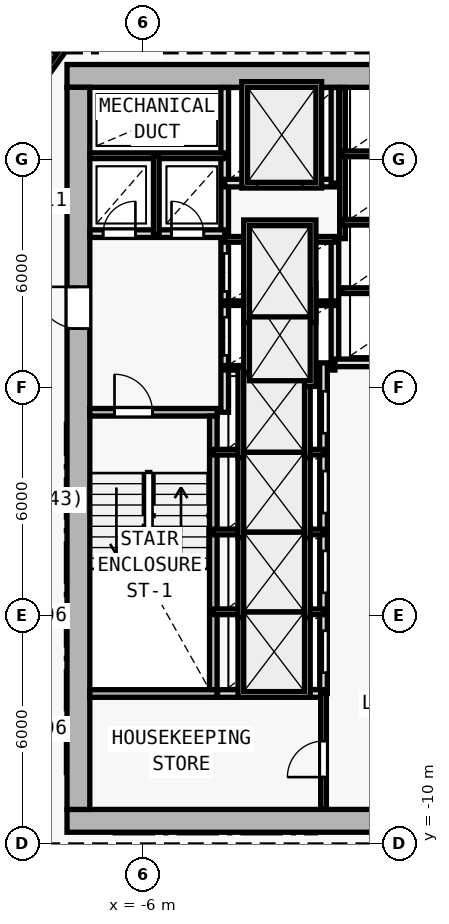
"""IFC4 building model, lengths in metres.
Left out: names, types, materials, properties, quantities, classifications, styles, units other than length and angle.
Written with IfcOpenShell. Run it as: python <this file> out.ifc"""

import sys

from ifc_helpers import new_model, si_unit, direction, frame, frame_2d, origin, origin_2d, place, context, subcontext, project, spatial, rectangle, i_section, extrude, element, fill, save


model = new_model("IFC4")
c1 = context("Model", 3, precision=1e-05, world=origin(), true_north=direction((0.0, 1.0)))
c2 = subcontext(c1, "Body", "Model", "MODEL_VIEW")
j1 = project(units=[si_unit("LENGTHUNIT", "METRE"), si_unit("PLANEANGLEUNIT", "RADIAN")], contexts=[c1])
p1 = place(None, origin())
s1 = spatial("IfcSite", under=j1, at=p1, CompositionType="ELEMENT")
p2 = place(p1, origin())
s2 = spatial("IfcBuilding", under=s1, at=p2, CompositionType="ELEMENT")
p3 = place(p2, frame((0.0, 0.0, 93.3)))
s3 = spatial("IfcBuildingStorey", under=s2, at=p3, CompositionType="ELEMENT", Elevation=93.3)
for number, where, z_axis, x_axis in (
    (1, (-7.7, -9.4, 0.0), (0.0, 0.0, 1.0), (1.0, 0.0, 0.0)),
    (2, (-7.7, 10.2, 0.0), (0.0, 0.0, 1.0), (1.0, 0.0, 0.0)),
    (3, (0.0, -9.4, 0.0), (0.0, 0.0, 1.0), (1.0, 0.0, 0.0)),
    (4, (-7.7, 2.0, 0.0), (0.0, 0.0, 1.0), (1.0, 0.0, 0.0)),
):
    element("IfcColumn", number, at=place(p3, frame(where, z_axis=z_axis, x_axis=x_axis)), inside=s3, PredefinedType="COLUMN", context=c2, shape_type="SweptSolid", body=[
        extrude(i_section(OverallWidth=0.409, OverallDepth=0.425, WebThickness=0.021, FlangeThickness=0.034, FilletRadius=0.015, at=origin_2d()), origin(), (0.0, 0.0, 1.0), 3.6),
    ])
p4 = place(p3, frame((-8.0, -9.4, 0.0), z_axis=(0.0, 0.0, 1.0), x_axis=(1.0, 0.0, 0.0)))
e5 = element("IfcWall", 5, at=p4, inside=s3, PredefinedType="SHEAR", context=c2, shape_type="SweptSolid", body=[
    extrude(rectangle(XDim=16.0, YDim=0.6, at=frame_2d((8.0, 0.0))), origin(), (0.0, 0.0, 1.0), 3.35),
])
p5 = place(p4, frame((9.65, 0.0, 0.0)))
e6 = element("IfcOpeningElement", 6, at=p5, cuts=e5, PredefinedType="OPENING", context=c2, shape_type="SweptSolid", body=[
    extrude(rectangle(XDim=1.5, YDim=2.2, at=frame_2d((0.75, 1.1))), frame((0.0, 0.31, 0.0), z_axis=(0.0, -1.0, 0.0), x_axis=(1.0, 0.0, 0.0)), (0.0, 0.0, 1.0), 0.62),
])
p6 = place(p3, frame((8.0, 10.2, 0.0), z_axis=(0.0, 0.0, 1.0), x_axis=(-1.0, 0.0, 0.0)))
e7 = element("IfcWall", 7, at=p6, inside=s3, PredefinedType="SHEAR", context=c2, shape_type="SweptSolid", body=[
    extrude(rectangle(XDim=16.0, YDim=0.6, at=frame_2d((8.0, 0.0))), origin(), (0.0, 0.0, 1.0), 3.35),
])
p7 = place(p6, frame((4.45, 0.0, 0.0)))
e8 = element("IfcOpeningElement", 8, at=p7, cuts=e7, PredefinedType="OPENING", context=c2, shape_type="SweptSolid", body=[
    extrude(rectangle(XDim=1.1, YDim=2.15, at=frame_2d((0.55, 1.075))), frame((0.0, 0.31, 0.0), z_axis=(0.0, -1.0, 0.0), x_axis=(1.0, 0.0, 0.0)), (0.0, 0.0, 1.0), 0.62),
])
p8 = place(p3, frame((-7.7, -9.1, 0.0), z_axis=(0.0, 0.0, 1.0), x_axis=(0.0, 1.0, 0.0)))
e9 = element("IfcWall", 9, at=p8, inside=s3, PredefinedType="SHEAR", context=c2, shape_type="SweptSolid", body=[
    extrude(rectangle(XDim=19.0, YDim=0.6, at=frame_2d((9.5, 0.0))), origin(), (0.0, 0.0, 1.0), 3.35),
])
p9 = place(p8, frame((12.65, 0.0, 0.0)))
e10 = element("IfcOpeningElement", 10, at=p9, cuts=e9, PredefinedType="OPENING", context=c2, shape_type="SweptSolid", body=[
    extrude(rectangle(XDim=1.1, YDim=2.15, at=frame_2d((0.55, 1.075))), frame((0.0, 0.31, 0.0), z_axis=(0.0, -1.0, 0.0), x_axis=(1.0, 0.0, 0.0)), (0.0, 0.0, 1.0), 0.62),
])
p10 = place(p3, frame((-7.4, 1.35, 0.0), z_axis=(0.0, 0.0, 1.0), x_axis=(1.0, 0.0, 0.0)))
e11 = element("IfcWall", 11, at=p10, inside=s3, PredefinedType="SOLIDWALL", context=c2, shape_type="SweptSolid", body=[
    extrude(rectangle(XDim=3.35, YDim=0.2, at=frame_2d((1.675, 0.0))), origin(), (0.0, 0.0, 1.0), 3.35),
])
p11 = place(p10, frame((0.65, 0.0, 0.0)))
e12 = element("IfcOpeningElement", 12, at=p11, cuts=e11, PredefinedType="OPENING", context=c2, shape_type="SweptSolid", body=[
    extrude(rectangle(XDim=1.0, YDim=2.15, at=frame_2d((0.5, 1.075))), frame((0.0, 0.11, 0.0), z_axis=(0.0, -1.0, 0.0), x_axis=(1.0, 0.0, 0.0)), (0.0, 0.0, 1.0), 0.22),
])
p12 = place(p3, frame((-4.15, -5.95, 0.0), z_axis=(0.0, 0.0, 1.0), x_axis=(0.0, 1.0, 0.0)))
e13 = element("IfcWall", 13, at=p12, inside=s3, PredefinedType="SOLIDWALL", context=c2, shape_type="SweptSolid", body=[
    extrude(rectangle(XDim=7.2, YDim=0.2, at=frame_2d((3.6, 0.0))), origin(), (0.0, 0.0, 1.0), 3.35),
])
p13 = place(p3, frame((-3.85, 1.35, 0.0), z_axis=(0.0, 0.0, 1.0), x_axis=(0.0, 1.0, 0.0)))
e14 = element("IfcWall", 14, at=p13, inside=s3, PredefinedType="SOLIDWALL", context=c2, shape_type="SweptSolid", body=[
    extrude(rectangle(XDim=8.545, YDim=0.2, at=frame_2d((4.272, 0.0))), origin(), (0.0, 0.0, 1.0), 3.35),
])
p14 = place(p13, frame((1.5, 0.0, 0.0)))
e15 = element("IfcOpeningElement", 15, at=p14, cuts=e14, PredefinedType="OPENING", context=c2, shape_type="SweptSolid", body=[
    extrude(rectangle(XDim=1.0, YDim=2.15, at=frame_2d((0.5, 1.075))), frame((0.0, 0.11, 0.0), z_axis=(0.0, -1.0, 0.0), x_axis=(1.0, 0.0, 0.0)), (0.0, 0.0, 1.0), 0.22),
])
p15 = place(p13, frame((3.18, 0.0, 0.0)))
e16 = element("IfcOpeningElement", 16, at=p15, cuts=e14, PredefinedType="OPENING", context=c2, shape_type="SweptSolid", body=[
    extrude(rectangle(XDim=1.0, YDim=2.15, at=frame_2d((0.5, 1.075))), frame((0.0, 0.11, 0.0), z_axis=(0.0, -1.0, 0.0), x_axis=(1.0, 0.0, 0.0)), (0.0, 0.0, 1.0), 0.22),
])
p16 = place(p3, frame((-7.395, 6.05, 0.0), z_axis=(0.0, 0.0, 1.0), x_axis=(1.0, 0.0, 0.0)))
e17 = element("IfcWall", 17, at=p16, inside=s3, PredefinedType="SOLIDWALL", context=c2, shape_type="SweptSolid", body=[
    extrude(rectangle(XDim=3.545, YDim=0.2, at=frame_2d((1.772, 0.0))), origin(), (0.0, 0.0, 1.0), 3.35),
])
p17 = place(p16, frame((0.345, 0.0, 0.0)))
e18 = element("IfcOpeningElement", 18, at=p17, cuts=e17, PredefinedType="OPENING", context=c2, shape_type="SweptSolid", body=[
    extrude(rectangle(XDim=0.85, YDim=2.1, at=frame_2d((0.425, 1.05))), frame((0.0, 0.11, 0.0), z_axis=(0.0, -1.0, 0.0), x_axis=(1.0, 0.0, 0.0)), (0.0, 0.0, 1.0), 0.22),
])
p18 = place(p16, frame((2.145, 0.0, 0.0)))
e19 = element("IfcOpeningElement", 19, at=p18, cuts=e17, PredefinedType="OPENING", context=c2, shape_type="SweptSolid", body=[
    extrude(rectangle(XDim=0.85, YDim=2.1, at=frame_2d((0.425, 1.05))), frame((0.0, 0.11, 0.0), z_axis=(0.0, -1.0, 0.0), x_axis=(1.0, 0.0, 0.0)), (0.0, 0.0, 1.0), 0.22),
])
p19 = place(p3, frame((-7.395, 8.1, 0.0), z_axis=(0.0, 0.0, 1.0), x_axis=(1.0, 0.0, 0.0)))
e20 = element("IfcWall", 20, at=p19, inside=s3, PredefinedType="PARTITIONING", context=c2, shape_type="SweptSolid", body=[
    extrude(rectangle(XDim=3.545, YDim=0.15, at=frame_2d((1.772, 0.0))), origin(), (0.0, 0.0, 1.0), 3.35),
])
p20 = place(p3, frame((-5.65, 6.05, 0.0), z_axis=(0.0, 0.0, 1.0), x_axis=(0.0, 1.0, 0.0)))
e21 = element("IfcWall", 21, at=p20, inside=s3, PredefinedType="PARTITIONING", context=c2, shape_type="SweptSolid", body=[
    extrude(rectangle(XDim=2.05, YDim=0.15, at=frame_2d((1.025, 0.0))), origin(), (0.0, 0.0, 1.0), 3.35),
])
p21 = place(p3, frame((-0.95, 2.65, 0.0), z_axis=(0.0, 0.0, 1.0), x_axis=(0.0, 1.0, 0.0)))
e22 = element("IfcWall", 22, at=p21, inside=s3, PredefinedType="SOLIDWALL", context=c2, shape_type="SweptSolid", body=[
    extrude(rectangle(XDim=3.27, YDim=0.2, at=frame_2d((1.635, 0.0))), origin(), (0.0, 0.0, 1.0), 3.35),
])
for number, where, z_axis, x_axis in (
    (23, (-3.85, 2.52, 0.0), (0.0, 0.0, 1.0), (1.0, 0.0, 0.0)),
    (24, (-3.85, 4.22, 0.0), (0.0, 0.0, 1.0), (1.0, 0.0, 0.0)),
):
    element("IfcWall", number, at=place(p3, frame(where, z_axis=z_axis, x_axis=x_axis)), inside=s3, PredefinedType="PARTITIONING", context=c2, shape_type="SweptSolid", body=[
        extrude(rectangle(XDim=2.9, YDim=0.12, at=frame_2d((1.45, 0.0))), origin(), (0.0, 0.0, 1.0), 3.35),
    ])
p22 = place(p3, frame((-3.85, 5.9, 0.0), z_axis=(0.0, 0.0, 1.0), x_axis=(1.0, 0.0, 0.0)))
e25 = element("IfcWall", 25, at=p22, inside=s3, PredefinedType="PARTITIONING", context=c2, shape_type="SweptSolid", body=[
    extrude(rectangle(XDim=2.9, YDim=0.15, at=frame_2d((1.45, 0.0))), origin(), (0.0, 0.0, 1.0), 3.35),
])
p23 = place(p3, frame((-3.85, 7.38, 0.0), z_axis=(0.0, 0.0, 1.0), x_axis=(1.0, 0.0, 0.0)))
e26 = element("IfcWall", 26, at=p23, inside=s3, PredefinedType="SOLIDWALL", context=c2, shape_type="SweptSolid", body=[
    extrude(rectangle(XDim=2.9, YDim=0.2, at=frame_2d((1.45, 0.0))), origin(), (0.0, 0.0, 1.0), 3.35),
])
p24 = place(p23, frame((0.85, 0.0, 0.0)))
e27 = element("IfcOpeningElement", 27, at=p24, cuts=e26, PredefinedType="OPENING", context=c2, shape_type="SweptSolid", body=[
    extrude(rectangle(XDim=1.2, YDim=2.2, at=frame_2d((0.6, 1.1))), frame((0.0, 0.11, 0.0), z_axis=(0.0, -1.0, 0.0), x_axis=(1.0, 0.0, 0.0)), (0.0, 0.0, 1.0), 0.22),
])
p25 = place(p3, frame((-0.95, 7.38, 0.0), z_axis=(0.0, 0.0, 1.0), x_axis=(0.0, 1.0, 0.0)))
e28 = element("IfcWall", 28, at=p25, inside=s3, PredefinedType="SOLIDWALL", context=c2, shape_type="SweptSolid", body=[
    extrude(rectangle(XDim=2.515, YDim=0.2, at=frame_2d((1.258, 0.0))), origin(), (0.0, 0.0, 1.0), 3.35),
])
p26 = place(p3, frame((-1.25, -6.05, 0.0), z_axis=(0.0, 0.0, 1.0), x_axis=(0.0, 1.0, 0.0)))
e29 = element("IfcWall", 29, at=p26, inside=s3, PredefinedType="SOLIDWALL", context=c2, shape_type="SweptSolid", body=[
    extrude(rectangle(XDim=8.7, YDim=0.2, at=frame_2d((4.35, 0.0))), origin(), (0.0, 0.0, 1.0), 3.35),
])
p27 = place(p26, frame((0.55, 0.0, 0.0)))
e30 = element("IfcOpeningElement", 30, at=p27, cuts=e29, PredefinedType="OPENING", context=c2, shape_type="SweptSolid", body=[
    extrude(rectangle(XDim=1.1, YDim=2.15, at=frame_2d((0.55, 1.075))), frame((0.0, 0.11, 0.0), z_axis=(0.0, -1.0, 0.0), x_axis=(1.0, 0.0, 0.0)), (0.0, 0.0, 1.0), 0.22),
])
p28 = place(p26, frame((2.65, 0.0, 0.0)))
e31 = element("IfcOpeningElement", 31, at=p28, cuts=e29, PredefinedType="OPENING", context=c2, shape_type="SweptSolid", body=[
    extrude(rectangle(XDim=1.1, YDim=2.15, at=frame_2d((0.55, 1.075))), frame((0.0, 0.11, 0.0), z_axis=(0.0, -1.0, 0.0), x_axis=(1.0, 0.0, 0.0)), (0.0, 0.0, 1.0), 0.22),
])
p29 = place(p26, frame((4.75, 0.0, 0.0)))
e32 = element("IfcOpeningElement", 32, at=p29, cuts=e29, PredefinedType="OPENING", context=c2, shape_type="SweptSolid", body=[
    extrude(rectangle(XDim=1.1, YDim=2.15, at=frame_2d((0.55, 1.075))), frame((0.0, 0.11, 0.0), z_axis=(0.0, -1.0, 0.0), x_axis=(1.0, 0.0, 0.0)), (0.0, 0.0, 1.0), 0.22),
])
p30 = place(p26, frame((6.85, 0.0, 0.0)))
e33 = element("IfcOpeningElement", 33, at=p30, cuts=e29, PredefinedType="OPENING", context=c2, shape_type="SweptSolid", body=[
    extrude(rectangle(XDim=1.1, YDim=2.15, at=frame_2d((0.55, 1.075))), frame((0.0, 0.11, 0.0), z_axis=(0.0, -1.0, 0.0), x_axis=(1.0, 0.0, 0.0)), (0.0, 0.0, 1.0), 0.22),
])
for number, where, z_axis, x_axis in (
    (34, (-4.15, -3.9, 0.0), (0.0, 0.0, 1.0), (1.0, 0.0, 0.0)),
    (35, (-4.15, -1.8, 0.0), (0.0, 0.0, 1.0), (1.0, 0.0, 0.0)),
    (36, (-4.15, 0.3, 0.0), (0.0, 0.0, 1.0), (1.0, 0.0, 0.0)),
):
    element("IfcWall", number, at=place(p3, frame(where, z_axis=z_axis, x_axis=x_axis)), inside=s3, PredefinedType="PARTITIONING", context=c2, shape_type="SweptSolid", body=[
        extrude(rectangle(XDim=2.9, YDim=0.15, at=frame_2d((1.45, 0.0))), origin(), (0.0, 0.0, 1.0), 3.35),
    ])
p31 = place(p3, frame((-0.95, 2.65, 0.0), z_axis=(0.0, 0.0, 1.0), x_axis=(1.0, 0.0, 0.0)))
e37 = element("IfcWall", 37, at=p31, inside=s3, PredefinedType="SOLIDWALL", context=c2, shape_type="SweptSolid", body=[
    extrude(rectangle(XDim=2.9, YDim=0.2, at=frame_2d((1.45, 0.0))), origin(), (0.0, 0.0, 1.0), 3.35),
])
p32 = place(p3, frame((-0.75, 5.92, 0.0), z_axis=(0.0, 0.0, 1.0), x_axis=(0.0, 1.0, 0.0)))
e38 = element("IfcWall", 38, at=p32, inside=s3, PredefinedType="PARTITIONING", context=c2, shape_type="SweptSolid", body=[
    extrude(rectangle(XDim=3.975, YDim=0.15, at=frame_2d((1.988, 0.0))), origin(), (0.0, 0.0, 1.0), 3.35),
])
for number, where, z_axis, x_axis in (
    (39, (-0.75, 4.55, 0.0), (0.0, 0.0, 1.0), (1.0, 0.0, 0.0)),
    (40, (-0.75, 6.35, 0.0), (0.0, 0.0, 1.0), (1.0, 0.0, 0.0)),
    (41, (-0.75, 8.15, 0.0), (0.0, 0.0, 1.0), (1.0, 0.0, 0.0)),
):
    element("IfcWall", number, at=place(p3, frame(where, z_axis=z_axis, x_axis=x_axis)), inside=s3, PredefinedType="PARTITIONING", context=c2, shape_type="SweptSolid", body=[
        extrude(rectangle(XDim=2.7, YDim=0.15, at=frame_2d((1.35, 0.0))), origin(), (0.0, 0.0, 1.0), 3.35),
    ])
p33 = place(p3, frame((-7.4, -6.05, 0.0), z_axis=(0.0, 0.0, 1.0), x_axis=(1.0, 0.0, 0.0)))
e42 = element("IfcWall", 42, at=p33, inside=s3, PredefinedType="SOLIDWALL", context=c2, shape_type="SweptSolid", body=[
    extrude(rectangle(XDim=3.35, YDim=0.2, at=frame_2d((1.675, 0.0))), origin(), (0.0, 0.0, 1.0), 3.35),
])
p34 = place(p3, frame((-4.04, -6.05, 0.0), z_axis=(0.0, 0.0, 1.0), x_axis=(1.0, 0.0, 0.0)))
e43 = element("IfcWall", 43, at=p34, inside=s3, PredefinedType="SOLIDWALL", context=c2, shape_type="SweptSolid", body=[
    extrude(rectangle(XDim=2.79, YDim=0.2, at=frame_2d((1.395, 0.0))), origin(), (0.0, 0.0, 1.0), 3.35),
])
p35 = place(p3, frame((-1.25, -9.095, 0.0), z_axis=(0.0, 0.0, 1.0), x_axis=(0.0, 1.0, 0.0)))
e44 = element("IfcWall", 44, at=p35, inside=s3, PredefinedType="PARTITIONING", context=c2, shape_type="SweptSolid", body=[
    extrude(rectangle(XDim=3.045, YDim=0.15, at=frame_2d((1.522, 0.0))), origin(), (0.0, 0.0, 1.0), 3.35),
])
p36 = place(p35, frame((0.845, 0.0, 0.0)))
e45 = element("IfcOpeningElement", 45, at=p36, cuts=e44, PredefinedType="OPENING", context=c2, shape_type="SweptSolid", body=[
    extrude(rectangle(XDim=0.95, YDim=2.1, at=frame_2d((0.475, 1.05))), frame((0.0, 0.085, 0.0), z_axis=(0.0, -1.0, 0.0), x_axis=(1.0, 0.0, 0.0)), (0.0, 0.0, 1.0), 0.17),
])
p37 = place(p3, frame((-9.86, 8.426, 0.0), z_axis=(0.0, 0.0, 1.0), x_axis=(0.582449511476, 0.812866881218, 0.0)))
e46 = element("IfcWall", 46, at=p37, inside=s3, PredefinedType="PARTITIONING", context=c2, shape_type="SweptSolid", body=[
    extrude(rectangle(XDim=4.84, YDim=0.15, at=frame_2d((2.42, 0.0))), origin(), (0.0, 0.0, 1.0), 2.925),
])
p38 = place(p37, frame((3.046, 0.0, 0.0)))
e47 = element("IfcOpeningElement", 47, at=p38, cuts=e46, PredefinedType="OPENING", context=c2, shape_type="SweptSolid", body=[
    extrude(rectangle(XDim=0.9, YDim=2.1, at=frame_2d((0.45, 1.05))), frame((0.0, 0.085, 0.0), z_axis=(0.0, -1.0, 0.0), x_axis=(1.0, 0.0, 0.0)), (0.0, 0.0, 1.0), 0.17),
])
p39 = place(p9, origin())
e48 = element("IfcDoor", 48, at=p39, inside=s3, OperationType="SINGLE_SWING_RIGHT", PredefinedType="DOOR", context=c2, shape_type="SweptSolid", body=[
    extrude(rectangle(XDim=1.1, YDim=2.15, at=frame_2d((0.55, 1.075))), frame((0.0, 0.025, 0.0), z_axis=(0.0, -1.0, 0.0), x_axis=(1.0, 0.0, 0.0)), (0.0, 0.0, 1.0), 0.05),
])
fill(e10, e48)
p40 = place(p11, origin())
e49 = element("IfcDoor", 49, at=p40, inside=s3, OperationType="SINGLE_SWING_LEFT", PredefinedType="DOOR", context=c2, shape_type="SweptSolid", body=[
    extrude(rectangle(XDim=1.0, YDim=2.15, at=frame_2d((0.5, 1.075))), frame((0.0, 0.025, 0.0), z_axis=(0.0, -1.0, 0.0), x_axis=(1.0, 0.0, 0.0)), (0.0, 0.0, 1.0), 0.05),
])
fill(e12, e49)
p41 = place(p17, origin())
e50 = element("IfcDoor", 50, at=p41, inside=s3, OperationType="SINGLE_SWING_RIGHT", PredefinedType="DOOR", context=c2, shape_type="SweptSolid", body=[
    extrude(rectangle(XDim=0.85, YDim=2.1, at=frame_2d((0.425, 1.05))), frame((0.0, 0.025, 0.0), z_axis=(0.0, -1.0, 0.0), x_axis=(1.0, 0.0, 0.0)), (0.0, 0.0, 1.0), 0.05),
])
fill(e18, e50)
p42 = place(p18, origin())
e51 = element("IfcDoor", 51, at=p42, inside=s3, OperationType="SINGLE_SWING_LEFT", PredefinedType="DOOR", context=c2, shape_type="SweptSolid", body=[
    extrude(rectangle(XDim=0.85, YDim=2.1, at=frame_2d((0.425, 1.05))), frame((0.0, 0.025, 0.0), z_axis=(0.0, -1.0, 0.0), x_axis=(1.0, 0.0, 0.0)), (0.0, 0.0, 1.0), 0.05),
])
fill(e19, e51)
p43 = place(p24, origin())
e52 = element("IfcDoor", 52, at=p43, inside=s3, OperationType="DOUBLE_DOOR_SLIDING", PredefinedType="DOOR", context=c2, shape_type="SweptSolid", body=[
    extrude(rectangle(XDim=1.2, YDim=2.2, at=frame_2d((0.6, 1.1))), frame((0.0, 0.025, 0.0), z_axis=(0.0, -1.0, 0.0), x_axis=(1.0, 0.0, 0.0)), (0.0, 0.0, 1.0), 0.05),
])
fill(e27, e52)
p44 = place(p27, origin())
e53 = element("IfcDoor", 53, at=p44, inside=s3, OperationType="DOUBLE_DOOR_SLIDING", PredefinedType="DOOR", context=c2, shape_type="SweptSolid", body=[
    extrude(rectangle(XDim=1.1, YDim=2.15, at=frame_2d((0.55, 1.075))), frame((0.0, 0.025, 0.0), z_axis=(0.0, -1.0, 0.0), x_axis=(1.0, 0.0, 0.0)), (0.0, 0.0, 1.0), 0.05),
])
fill(e30, e53)
p45 = place(p28, origin())
e54 = element("IfcDoor", 54, at=p45, inside=s3, OperationType="DOUBLE_DOOR_SLIDING", PredefinedType="DOOR", context=c2, shape_type="SweptSolid", body=[
    extrude(rectangle(XDim=1.1, YDim=2.15, at=frame_2d((0.55, 1.075))), frame((0.0, 0.025, 0.0), z_axis=(0.0, -1.0, 0.0), x_axis=(1.0, 0.0, 0.0)), (0.0, 0.0, 1.0), 0.05),
])
fill(e31, e54)
p46 = place(p29, origin())
e55 = element("IfcDoor", 55, at=p46, inside=s3, OperationType="DOUBLE_DOOR_SLIDING", PredefinedType="DOOR", context=c2, shape_type="SweptSolid", body=[
    extrude(rectangle(XDim=1.1, YDim=2.15, at=frame_2d((0.55, 1.075))), frame((0.0, 0.025, 0.0), z_axis=(0.0, -1.0, 0.0), x_axis=(1.0, 0.0, 0.0)), (0.0, 0.0, 1.0), 0.05),
])
fill(e32, e55)
p47 = place(p30, origin())
e56 = element("IfcDoor", 56, at=p47, inside=s3, OperationType="DOUBLE_DOOR_SLIDING", PredefinedType="DOOR", context=c2, shape_type="SweptSolid", body=[
    extrude(rectangle(XDim=1.1, YDim=2.15, at=frame_2d((0.55, 1.075))), frame((0.0, 0.025, 0.0), z_axis=(0.0, -1.0, 0.0), x_axis=(1.0, 0.0, 0.0)), (0.0, 0.0, 1.0), 0.05),
])
fill(e33, e56)
p48 = place(p14, origin())
e57 = element("IfcDoor", 57, at=p48, inside=s3, OperationType="DOUBLE_DOOR_SLIDING", PredefinedType="DOOR", context=c2, shape_type="SweptSolid", body=[
    extrude(rectangle(XDim=1.0, YDim=2.15, at=frame_2d((0.5, 1.075))), frame((0.0, 0.025, 0.0), z_axis=(0.0, -1.0, 0.0), x_axis=(1.0, 0.0, 0.0)), (0.0, 0.0, 1.0), 0.05),
])
fill(e15, e57)
p49 = place(p15, origin())
e58 = element("IfcDoor", 58, at=p49, inside=s3, OperationType="DOUBLE_DOOR_SLIDING", PredefinedType="DOOR", context=c2, shape_type="SweptSolid", body=[
    extrude(rectangle(XDim=1.0, YDim=2.15, at=frame_2d((0.5, 1.075))), frame((0.0, 0.025, 0.0), z_axis=(0.0, -1.0, 0.0), x_axis=(1.0, 0.0, 0.0)), (0.0, 0.0, 1.0), 0.05),
])
fill(e16, e58)
p50 = place(p36, origin())
e59 = element("IfcDoor", 59, at=p50, inside=s3, OperationType="SINGLE_SWING_LEFT", PredefinedType="DOOR", context=c2, shape_type="SweptSolid", body=[
    extrude(rectangle(XDim=0.95, YDim=2.1, at=frame_2d((0.475, 1.05))), frame((0.0, 0.025, 0.0), z_axis=(0.0, -1.0, 0.0), x_axis=(1.0, 0.0, 0.0)), (0.0, 0.0, 1.0), 0.05),
])
fill(e45, e59)
save(model, sys.argv[1])
